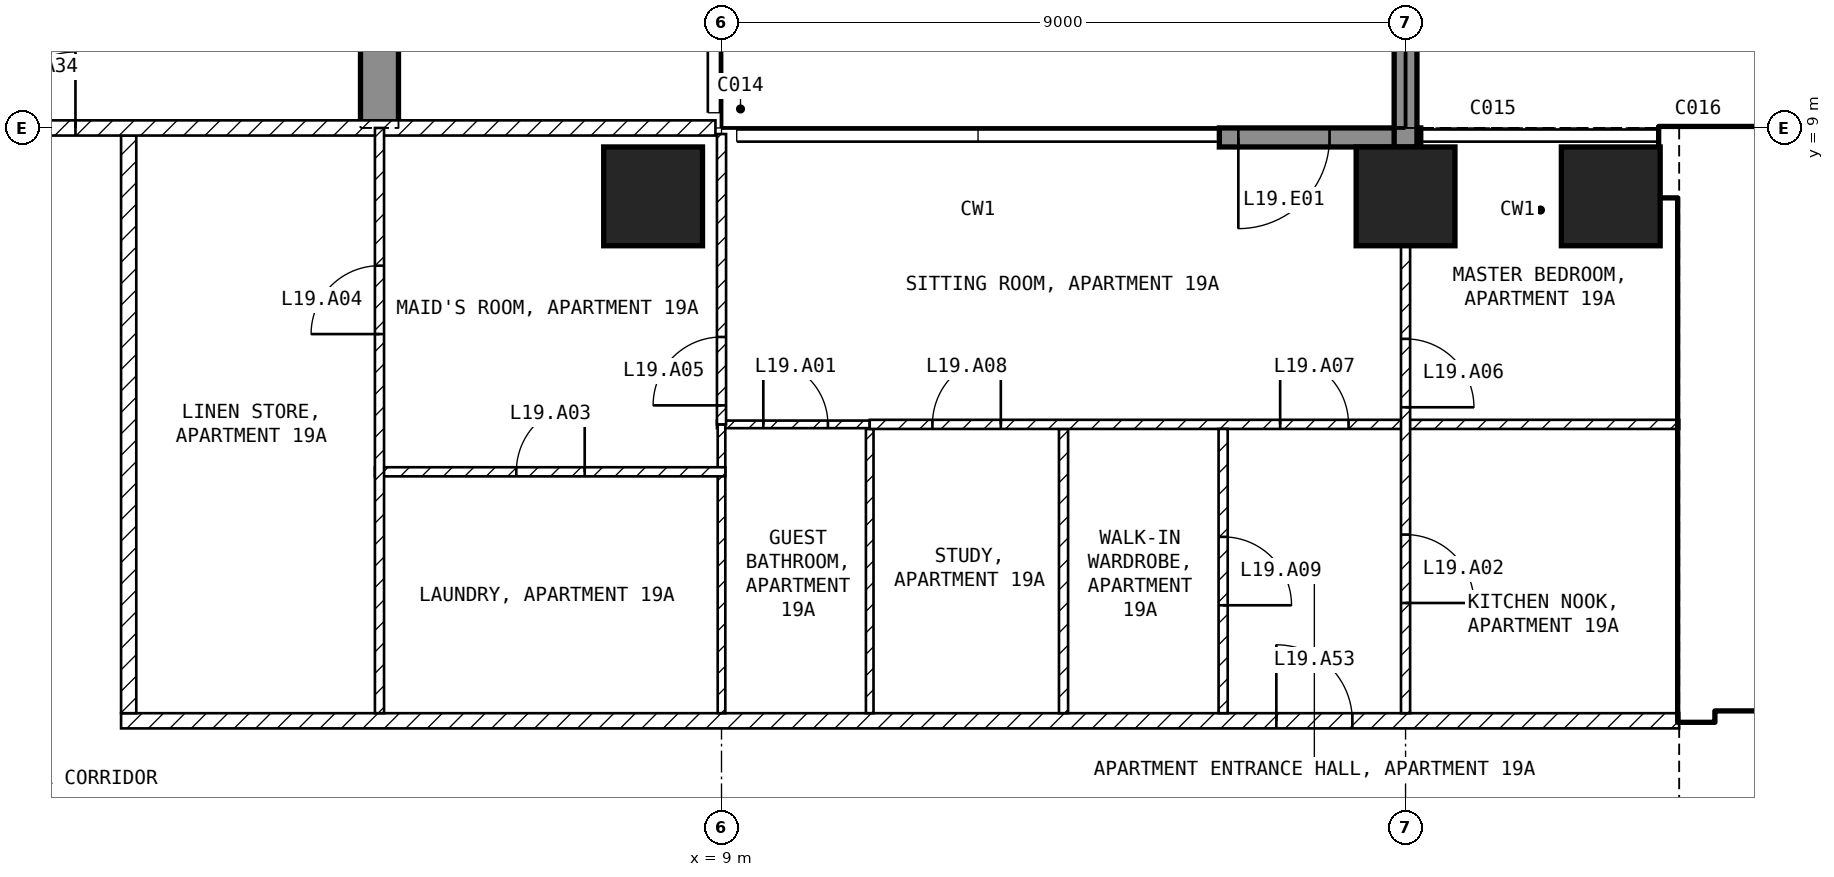
"""IFC4 building model, lengths in metres.
Left out: names, types, materials, properties, quantities, classifications, styles, units other than length and angle.
Written with IfcOpenShell. Run it as: python <this file> out.ifc"""

import sys

from ifc_helpers import new_model, si_unit, direction, frame, frame_2d, origin, origin_2d, place, context, subcontext, project, spatial, polyline, rectangle, outline, extrude, element, fill, save


model = new_model("IFC4")
c1 = context("Model", 3, precision=1e-05, world=origin(), true_north=direction((0.0, 1.0)))
c2 = subcontext(c1, "Body", "Model", "MODEL_VIEW")
j1 = project(units=[si_unit("LENGTHUNIT", "METRE"), si_unit("PLANEANGLEUNIT", "RADIAN")], contexts=[c1])
p1 = place(None, origin())
s1 = spatial("IfcSite", under=j1, at=p1, CompositionType="ELEMENT")
p2 = place(p1, origin())
s2 = spatial("IfcBuilding", under=s1, at=p2, CompositionType="ELEMENT")
p3 = place(p2, frame((0.0, 0.0, 85.5)))
s3 = spatial("IfcBuildingStorey", under=s2, at=p3, CompositionType="ELEMENT", Elevation=85.5)
for number, where, z_axis, x_axis in (
    (1, (8.1, 8.1, -0.25), (0.0, 0.0, 1.0), (1.0, 0.0, 0.0)),
    (2, (18.0, 8.1, -0.25), (0.0, 0.0, 1.0), (1.0, 0.0, 0.0)),
    (3, (20.7, 8.1, -0.25), (0.0, 0.0, 1.0), (1.0, 0.0, 0.0)),
):
    element("IfcColumn", number, at=place(p3, frame(where, z_axis=z_axis, x_axis=x_axis)), inside=s3, PredefinedType="COLUMN", context=c2, shape_type="SweptSolid", body=[
        extrude(rectangle(XDim=1.3, YDim=1.3, at=origin_2d()), origin(), (0.0, 0.0, 1.0), 3.5),
    ])
p4 = place(p3, frame((4.25, 9.0, -0.25), z_axis=(1.0, 0.0, 0.0), x_axis=(0.0, 1.0, 0.0)))
e4 = element("IfcWall", 4, at=p4, inside=s3, PredefinedType="SHEAR", context=c2, shape_type="SweptSolid", body=[
    extrude(outline(polyline([(0.0, 0.0), (2.1, 0.0), (2.1, 2.65), (4.5, 2.65), (4.5, 0.0), (9.9, 0.0), (9.9, 2.65), (12.3, 2.65), (12.3, 0.0), (16.45, 0.0), (16.45, 3.5), (0.0, 3.5), (0.0, 0.0)])), origin(), (0.0, 0.0, 1.0), 0.5),
])
p5 = place(p3, frame((18.2, 8.875, 0.0), z_axis=(0.0, 0.0, 1.0), x_axis=(-1.0, 0.0, 0.0)))
e5 = element("IfcWall", 5, at=p5, inside=s3, PredefinedType="SOLIDWALL", context=c2, shape_type="SweptSolid", body=[
    extrude(rectangle(XDim=2.65, YDim=0.25, at=frame_2d((1.325, 0.0))), origin(), (0.0, 0.0, 1.0), 3.25),
])
p6 = place(p5, frame((1.2, 0.0, 0.0)))
e6 = element("IfcOpeningElement", 6, at=p6, cuts=e5, PredefinedType="OPENING", context=c2, shape_type="SweptSolid", body=[
    extrude(rectangle(XDim=1.2, YDim=2.4, at=frame_2d((0.6, 1.2))), frame((0.0, 0.135, 0.0), z_axis=(0.0, -1.0, 0.0), x_axis=(1.0, 0.0, 0.0)), (0.0, 0.0, 1.0), 0.27),
])
p7 = place(p3, frame((18.0, 8.75, 0.0), z_axis=(0.0, 0.0, 1.0), x_axis=(0.0, 1.0, 0.0)))
e7 = element("IfcWall", 7, at=p7, inside=s3, PredefinedType="SOLIDWALL", context=c2, shape_type="SweptSolid", body=[
    extrude(rectangle(XDim=2.95, YDim=0.3, at=frame_2d((1.475, 0.0))), origin(), (0.0, 0.0, 1.0), 3.25),
])
p8 = place(p3, frame((21.35, 8.55, 0.0), z_axis=(0.0, 0.0, 1.0), x_axis=(1.0, 0.0, 0.0)))
e8 = element("IfcWall", 8, at=p8, inside=s3, PredefinedType="SHEAR", context=c2, shape_type="SweptSolid", body=[
    extrude(rectangle(XDim=10.15, YDim=0.9, at=frame_2d((5.075, 0.0))), origin(), (0.0, 0.0, 1.0), 3.25),
])
p9 = place(p3, frame((21.825, 1.2, 0.0), z_axis=(0.0, 0.0, 1.0), x_axis=(0.0, 1.0, 0.0)))
e9 = element("IfcWall", 9, at=p9, inside=s3, PredefinedType="SHEAR", context=c2, shape_type="SweptSolid", body=[
    extrude(rectangle(XDim=6.9, YDim=0.45, at=frame_2d((3.45, 0.0))), origin(), (0.0, 0.0, 1.0), 3.25),
])
p10 = place(p3, frame((22.05, 1.45, 0.0), z_axis=(0.0, 0.0, 1.0), x_axis=(1.0, 0.0, 0.0)))
e10 = element("IfcWall", 10, at=p10, inside=s3, PredefinedType="SOLIDWALL", context=c2, shape_type="SweptSolid", body=[
    extrude(rectangle(XDim=13.05, YDim=0.2, at=frame_2d((6.525, 0.0))), origin(), (0.0, 0.0, 1.0), 3.25),
])
p11 = place(p10, frame((0.75, 0.0, 0.0)))
e11 = element("IfcOpeningElement", 11, at=p11, cuts=e10, PredefinedType="OPENING", context=c2, shape_type="SweptSolid", body=[
    extrude(rectangle(XDim=1.0, YDim=2.1, at=frame_2d((0.5, 1.05))), frame((0.0, 0.11, 0.0), z_axis=(0.0, -1.0, 0.0), x_axis=(1.0, 0.0, 0.0)), (0.0, 0.0, 1.0), 0.22),
])
p12 = place(p10, frame((3.25, 0.0, 0.0)))
e12 = element("IfcOpeningElement", 12, at=p12, cuts=e10, PredefinedType="OPENING", context=c2, shape_type="SweptSolid", body=[
    extrude(rectangle(XDim=1.0, YDim=2.1, at=frame_2d((0.5, 1.05))), frame((0.0, 0.11, 0.0), z_axis=(0.0, -1.0, 0.0), x_axis=(1.0, 0.0, 0.0)), (0.0, 0.0, 1.0), 0.22),
])
p13 = place(p3, frame((22.05, 5.15, 0.0), z_axis=(0.0, 0.0, 1.0), x_axis=(1.0, 0.0, 0.0)))
e13 = element("IfcWall", 13, at=p13, inside=s3, PredefinedType="SOLIDWALL", context=c2, shape_type="SweptSolid", body=[
    extrude(rectangle(XDim=6.3, YDim=0.2, at=frame_2d((3.15, 0.0))), origin(), (0.0, 0.0, 1.0), 3.25),
])
p14 = place(p13, frame((0.2, 0.0, 0.0)))
e14 = element("IfcOpeningElement", 14, at=p14, cuts=e13, PredefinedType="OPENING", context=c2, shape_type="SweptSolid", body=[
    extrude(rectangle(XDim=1.0, YDim=2.1, at=frame_2d((0.5, 1.05))), frame((0.0, 0.11, 0.0), z_axis=(0.0, -1.0, 0.0), x_axis=(1.0, 0.0, 0.0)), (0.0, 0.0, 1.0), 0.22),
])
p15 = place(p3, frame((1.1, 1.2, 0.0), z_axis=(0.0, 0.0, 1.0), x_axis=(1.0, 0.0, 0.0)))
e15 = element("IfcWall", 15, at=p15, inside=s3, PredefinedType="PARTITIONING", context=c2, shape_type="SweptSolid", body=[
    extrude(rectangle(XDim=20.5, YDim=0.2, at=frame_2d((10.25, 0.0))), origin(), (0.0, 0.0, 1.0), 3.25),
])
p16 = place(p15, frame((15.2, 0.0, 0.0)))
e16 = element("IfcOpeningElement", 16, at=p16, cuts=e15, PredefinedType="OPENING", context=c2, shape_type="SweptSolid", body=[
    extrude(rectangle(XDim=1.0, YDim=2.1, at=frame_2d((0.5, 1.05))), frame((0.0, 0.11, 0.0), z_axis=(0.0, -1.0, 0.0), x_axis=(1.0, 0.0, 0.0)), (0.0, 0.0, 1.0), 0.22),
])
p17 = place(p3, frame((1.2, 8.9, 0.0), z_axis=(0.0, 0.0, 1.0), x_axis=(0.0, -1.0, 0.0)))
e17 = element("IfcWall", 17, at=p17, inside=s3, PredefinedType="PARTITIONING", context=c2, shape_type="SweptSolid", body=[
    extrude(rectangle(XDim=7.6, YDim=0.2, at=frame_2d((3.8, 0.0))), origin(), (0.0, 0.0, 1.0), 3.25),
])
p18 = place(p3, frame((-8.92, 9.0, 0.0), z_axis=(0.0, 0.0, 1.0), x_axis=(1.0, 0.0, 0.0)))
e18 = element("IfcWall", 18, at=p18, inside=s3, PredefinedType="PARTITIONING", context=c2, shape_type="SweptSolid", body=[
    extrude(rectangle(XDim=17.84, YDim=0.2, at=frame_2d((8.92, 0.0))), origin(), (0.0, 0.0, 1.0), 3.25),
])
p19 = place(p18, frame((8.42, 0.0, 0.0)))
e19 = element("IfcOpeningElement", 19, at=p19, cuts=e18, PredefinedType="OPENING", context=c2, shape_type="SweptSolid", body=[
    extrude(rectangle(XDim=1.0, YDim=2.1, at=frame_2d((0.5, 1.05))), frame((0.0, 0.11, 0.0), z_axis=(0.0, -1.0, 0.0), x_axis=(1.0, 0.0, 0.0)), (0.0, 0.0, 1.0), 0.22),
])
p20 = place(p3, frame((10.95, 5.04, 0.0), z_axis=(0.0, 0.0, 1.0), x_axis=(0.0, -1.0, 0.0)))
e20 = element("IfcWall", 20, at=p20, inside=s3, PredefinedType="PARTITIONING", context=c2, shape_type="SweptSolid", body=[
    extrude(rectangle(XDim=3.74, YDim=0.1, at=frame_2d((1.87, 0.0))), origin(), (0.0, 0.0, 1.0), 3.25),
])
p21 = place(p3, frame((8.94, 5.1, 0.0), z_axis=(0.0, 0.0, 1.0), x_axis=(1.0, 0.0, 0.0)))
e21 = element("IfcWall", 21, at=p21, inside=s3, PredefinedType="PARTITIONING", context=c2, shape_type="SweptSolid", body=[
    extrude(rectangle(XDim=2.01, YDim=0.1, at=frame_2d((1.005, 0.0))), origin(), (0.0, 0.0, 1.0), 3.25),
])
p22 = place(p21, frame((0.61, 0.0, 0.0)))
e22 = element("IfcOpeningElement", 22, at=p22, cuts=e21, PredefinedType="OPENING", context=c2, shape_type="SweptSolid", body=[
    extrude(rectangle(XDim=0.85, YDim=2.1, at=frame_2d((0.425, 1.05))), frame((0.0, 0.06, 0.0), z_axis=(0.0, -1.0, 0.0), x_axis=(1.0, 0.0, 0.0)), (0.0, 0.0, 1.0), 0.12),
])
p23 = place(p3, frame((9.0, 1.3, 0.0), z_axis=(0.0, 0.0, 1.0), x_axis=(0.0, 1.0, 0.0)))
e23 = element("IfcWall", 23, at=p23, inside=s3, PredefinedType="PARTITIONING", context=c2, shape_type="SweptSolid", body=[
    extrude(rectangle(XDim=3.8, YDim=0.1, at=frame_2d((1.9, 0.0))), origin(), (0.0, 0.0, 1.0), 3.25),
])
p24 = place(p3, frame((13.5, 5.04, 0.0), z_axis=(0.0, 0.0, 1.0), x_axis=(0.0, -1.0, 0.0)))
e24 = element("IfcWall", 24, at=p24, inside=s3, PredefinedType="PARTITIONING", context=c2, shape_type="SweptSolid", body=[
    extrude(rectangle(XDim=3.74, YDim=0.12, at=frame_2d((1.87, 0.0))), origin(), (0.0, 0.0, 1.0), 3.25),
])
p25 = place(p3, frame((10.95, 5.1, 0.0), z_axis=(0.0, 0.0, 1.0), x_axis=(1.0, 0.0, 0.0)))
e25 = element("IfcWall", 25, at=p25, inside=s3, PredefinedType="PARTITIONING", context=c2, shape_type="SweptSolid", body=[
    extrude(rectangle(XDim=10.65, YDim=0.12, at=frame_2d((5.325, 0.0))), origin(), (0.0, 0.0, 1.0), 3.25),
])
p26 = place(p25, frame((5.4, 0.0, 0.0)))
e26 = element("IfcOpeningElement", 26, at=p26, cuts=e25, PredefinedType="OPENING", context=c2, shape_type="SweptSolid", body=[
    extrude(rectangle(XDim=0.9, YDim=2.1, at=frame_2d((0.45, 1.05))), frame((0.0, 0.07, 0.0), z_axis=(0.0, -1.0, 0.0), x_axis=(1.0, 0.0, 0.0)), (0.0, 0.0, 1.0), 0.14),
])
p27 = place(p25, frame((0.825, 0.0, 0.0)))
e27 = element("IfcOpeningElement", 27, at=p27, cuts=e25, PredefinedType="OPENING", context=c2, shape_type="SweptSolid", body=[
    extrude(rectangle(XDim=0.9, YDim=2.1, at=frame_2d((0.45, 1.05))), frame((0.0, 0.07, 0.0), z_axis=(0.0, -1.0, 0.0), x_axis=(1.0, 0.0, 0.0)), (0.0, 0.0, 1.0), 0.14),
])
p28 = place(p3, frame((15.6, 5.04, 0.0), z_axis=(0.0, 0.0, 1.0), x_axis=(0.0, -1.0, 0.0)))
e28 = element("IfcWall", 28, at=p28, inside=s3, PredefinedType="PARTITIONING", context=c2, shape_type="SweptSolid", body=[
    extrude(rectangle(XDim=3.74, YDim=0.12, at=frame_2d((1.87, 0.0))), origin(), (0.0, 0.0, 1.0), 3.25),
])
p29 = place(p28, frame((1.42, 0.0, 0.0)))
e29 = element("IfcOpeningElement", 29, at=p29, cuts=e28, PredefinedType="OPENING", context=c2, shape_type="SweptSolid", body=[
    extrude(rectangle(XDim=0.9, YDim=2.1, at=frame_2d((0.45, 1.05))), frame((0.0, 0.07, 0.0), z_axis=(0.0, -1.0, 0.0), x_axis=(1.0, 0.0, 0.0)), (0.0, 0.0, 1.0), 0.14),
])
p30 = place(p3, frame((18.0, 7.45, 0.0), z_axis=(0.0, 0.0, 1.0), x_axis=(0.0, -1.0, 0.0)))
e30 = element("IfcWall", 30, at=p30, inside=s3, PredefinedType="PARTITIONING", context=c2, shape_type="SweptSolid", body=[
    extrude(rectangle(XDim=6.15, YDim=0.12, at=frame_2d((3.075, 0.0))), origin(), (0.0, 0.0, 1.0), 2.346),
])
p31 = place(p30, frame((3.8, 0.0, 0.0)))
e31 = element("IfcOpeningElement", 31, at=p31, cuts=e30, PredefinedType="OPENING", context=c2, shape_type="SweptSolid", body=[
    extrude(rectangle(XDim=0.9, YDim=2.1, at=frame_2d((0.45, 1.05))), frame((0.0, 0.07, 0.0), z_axis=(0.0, -1.0, 0.0), x_axis=(1.0, 0.0, 0.0)), (0.0, 0.0, 1.0), 0.14),
])
p32 = place(p30, frame((1.225, 0.0, 0.0)))
e32 = element("IfcOpeningElement", 32, at=p32, cuts=e30, PredefinedType="OPENING", context=c2, shape_type="SweptSolid", body=[
    extrude(rectangle(XDim=0.9, YDim=2.1, at=frame_2d((0.45, 1.05))), frame((0.0, 0.07, 0.0), z_axis=(0.0, -1.0, 0.0), x_axis=(1.0, 0.0, 0.0)), (0.0, 0.0, 1.0), 0.14),
])
p33 = place(p3, frame((9.0, 5.1, 0.0), z_axis=(0.0, 0.0, 1.0), x_axis=(0.0, 1.0, 0.0)))
e33 = element("IfcWall", 33, at=p33, inside=s3, PredefinedType="PARTITIONING", context=c2, shape_type="SweptSolid", body=[
    extrude(rectangle(XDim=3.82, YDim=0.12, at=frame_2d((1.91, 0.0))), origin(), (0.0, 0.0, 1.0), 3.25),
])
p34 = place(p33, frame((0.25, 0.0, 0.0)))
e34 = element("IfcOpeningElement", 34, at=p34, cuts=e33, PredefinedType="OPENING", context=c2, shape_type="SweptSolid", body=[
    extrude(rectangle(XDim=0.9, YDim=2.1, at=frame_2d((0.45, 1.05))), frame((0.0, 0.07, 0.0), z_axis=(0.0, -1.0, 0.0), x_axis=(1.0, 0.0, 0.0)), (0.0, 0.0, 1.0), 0.14),
])
p35 = place(p3, frame((4.44, 4.476, 0.0), z_axis=(0.0, 0.0, 1.0), x_axis=(1.0, 0.0, 0.0)))
e35 = element("IfcWall", 35, at=p35, inside=s3, PredefinedType="PARTITIONING", context=c2, shape_type="SweptSolid", body=[
    extrude(rectangle(XDim=4.61, YDim=0.12, at=frame_2d((2.305, 0.0))), origin(), (0.0, 0.0, 1.0), 3.25),
])
p36 = place(p35, frame((1.86, 0.0, 0.0)))
e36 = element("IfcOpeningElement", 36, at=p36, cuts=e35, PredefinedType="OPENING", context=c2, shape_type="SweptSolid", body=[
    extrude(rectangle(XDim=0.9, YDim=2.1, at=frame_2d((0.45, 1.05))), frame((0.0, 0.07, 0.0), z_axis=(0.0, -1.0, 0.0), x_axis=(1.0, 0.0, 0.0)), (0.0, 0.0, 1.0), 0.14),
])
p37 = place(p3, frame((4.5, 1.3, 0.0), z_axis=(0.0, 0.0, 1.0), x_axis=(0.0, 1.0, 0.0)))
e37 = element("IfcWall", 37, at=p37, inside=s3, PredefinedType="PARTITIONING", context=c2, shape_type="SweptSolid", body=[
    extrude(rectangle(XDim=7.7, YDim=0.12, at=frame_2d((3.85, 0.0))), origin(), (0.0, 0.0, 1.0), 3.25),
])
p38 = place(p37, frame((4.988, 0.0, 0.0)))
e38 = element("IfcOpeningElement", 38, at=p38, cuts=e37, PredefinedType="OPENING", context=c2, shape_type="SweptSolid", body=[
    extrude(rectangle(XDim=0.9, YDim=2.1, at=frame_2d((0.45, 1.05))), frame((0.0, 0.07, 0.0), z_axis=(0.0, -1.0, 0.0), x_axis=(1.0, 0.0, 0.0)), (0.0, 0.0, 1.0), 0.14),
])
p39 = place(p6, origin())
e39 = element("IfcDoor", 39, at=p39, inside=s3, OperationType="SINGLE_SWING_RIGHT", PredefinedType="DOOR", context=c2, shape_type="SweptSolid", body=[
    extrude(rectangle(XDim=1.2, YDim=2.4, at=frame_2d((0.6, 1.2))), frame((0.0, 0.025, 0.0), z_axis=(0.0, -1.0, 0.0), x_axis=(1.0, 0.0, 0.0)), (0.0, 0.0, 1.0), 0.05),
])
fill(e6, e39)
p40 = place(p14, origin())
e40 = element("IfcDoor", 40, at=p40, inside=s3, OperationType="SINGLE_SWING_LEFT", PredefinedType="DOOR", context=c2, shape_type="SweptSolid", body=[
    extrude(rectangle(XDim=1.0, YDim=2.1, at=frame_2d((0.5, 1.05))), frame((0.0, 0.025, 0.0), z_axis=(0.0, -1.0, 0.0), x_axis=(1.0, 0.0, 0.0)), (0.0, 0.0, 1.0), 0.05),
])
fill(e14, e40)
p41 = place(p22, origin())
e41 = element("IfcDoor", 41, at=p41, inside=s3, OperationType="SINGLE_SWING_LEFT", PredefinedType="DOOR", context=c2, shape_type="SweptSolid", body=[
    extrude(rectangle(XDim=0.85, YDim=2.1, at=frame_2d((0.425, 1.05))), frame((0.0, 0.025, 0.0), z_axis=(0.0, -1.0, 0.0), x_axis=(1.0, 0.0, 0.0)), (0.0, 0.0, 1.0), 0.05),
])
fill(e22, e41)
p42 = place(p31, origin())
e42 = element("IfcDoor", 42, at=p42, inside=s3, OperationType="SINGLE_SWING_RIGHT", PredefinedType="DOOR", context=c2, shape_type="SweptSolid", body=[
    extrude(rectangle(XDim=0.9, YDim=2.1, at=frame_2d((0.45, 1.05))), frame((0.0, 0.025, 0.0), z_axis=(0.0, -1.0, 0.0), x_axis=(1.0, 0.0, 0.0)), (0.0, 0.0, 1.0), 0.05),
])
fill(e31, e42)
p43 = place(p36, origin())
e43 = element("IfcDoor", 43, at=p43, inside=s3, OperationType="SINGLE_SWING_RIGHT", PredefinedType="DOOR", context=c2, shape_type="SweptSolid", body=[
    extrude(rectangle(XDim=0.9, YDim=2.1, at=frame_2d((0.45, 1.05))), frame((0.0, 0.025, 0.0), z_axis=(0.0, -1.0, 0.0), x_axis=(1.0, 0.0, 0.0)), (0.0, 0.0, 1.0), 0.05),
])
fill(e36, e43)
p44 = place(p38, origin())
e44 = element("IfcDoor", 44, at=p44, inside=s3, OperationType="SINGLE_SWING_LEFT", PredefinedType="DOOR", context=c2, shape_type="SweptSolid", body=[
    extrude(rectangle(XDim=0.9, YDim=2.1, at=frame_2d((0.45, 1.05))), frame((0.0, 0.025, 0.0), z_axis=(0.0, -1.0, 0.0), x_axis=(1.0, 0.0, 0.0)), (0.0, 0.0, 1.0), 0.05),
])
fill(e38, e44)
p45 = place(p34, origin())
e45 = element("IfcDoor", 45, at=p45, inside=s3, OperationType="SINGLE_SWING_LEFT", PredefinedType="DOOR", context=c2, shape_type="SweptSolid", body=[
    extrude(rectangle(XDim=0.9, YDim=2.1, at=frame_2d((0.45, 1.05))), frame((0.0, 0.025, 0.0), z_axis=(0.0, -1.0, 0.0), x_axis=(1.0, 0.0, 0.0)), (0.0, 0.0, 1.0), 0.05),
])
fill(e34, e45)
p46 = place(p32, origin())
e46 = element("IfcDoor", 46, at=p46, inside=s3, OperationType="SINGLE_SWING_RIGHT", PredefinedType="DOOR", context=c2, shape_type="SweptSolid", body=[
    extrude(rectangle(XDim=0.9, YDim=2.1, at=frame_2d((0.45, 1.05))), frame((0.0, 0.025, 0.0), z_axis=(0.0, -1.0, 0.0), x_axis=(1.0, 0.0, 0.0)), (0.0, 0.0, 1.0), 0.05),
])
fill(e32, e46)
p47 = place(p26, origin())
e47 = element("IfcDoor", 47, at=p47, inside=s3, OperationType="SINGLE_SWING_LEFT", PredefinedType="DOOR", context=c2, shape_type="SweptSolid", body=[
    extrude(rectangle(XDim=0.9, YDim=2.1, at=frame_2d((0.45, 1.05))), frame((0.0, 0.025, 0.0), z_axis=(0.0, -1.0, 0.0), x_axis=(1.0, 0.0, 0.0)), (0.0, 0.0, 1.0), 0.05),
])
fill(e26, e47)
p48 = place(p27, origin())
e48 = element("IfcDoor", 48, at=p48, inside=s3, OperationType="SINGLE_SWING_RIGHT", PredefinedType="DOOR", context=c2, shape_type="SweptSolid", body=[
    extrude(rectangle(XDim=0.9, YDim=2.1, at=frame_2d((0.45, 1.05))), frame((0.0, 0.025, 0.0), z_axis=(0.0, -1.0, 0.0), x_axis=(1.0, 0.0, 0.0)), (0.0, 0.0, 1.0), 0.05),
])
fill(e27, e48)
p49 = place(p29, origin())
e49 = element("IfcDoor", 49, at=p49, inside=s3, OperationType="SINGLE_SWING_RIGHT", PredefinedType="DOOR", context=c2, shape_type="SweptSolid", body=[
    extrude(rectangle(XDim=0.9, YDim=2.1, at=frame_2d((0.45, 1.05))), frame((0.0, 0.025, 0.0), z_axis=(0.0, -1.0, 0.0), x_axis=(1.0, 0.0, 0.0)), (0.0, 0.0, 1.0), 0.05),
])
fill(e29, e49)
p50 = place(p19, origin())
e50 = element("IfcDoor", 50, at=p50, inside=s3, OperationType="SINGLE_SWING_RIGHT", PredefinedType="DOOR", context=c2, shape_type="SweptSolid", body=[
    extrude(rectangle(XDim=1.0, YDim=2.1, at=frame_2d((0.5, 1.05))), frame((0.0, 0.025, 0.0), z_axis=(0.0, -1.0, 0.0), x_axis=(1.0, 0.0, 0.0)), (0.0, 0.0, 1.0), 0.05),
])
fill(e19, e50)
p51 = place(p16, origin())
e51 = element("IfcDoor", 51, at=p51, inside=s3, OperationType="SINGLE_SWING_LEFT", PredefinedType="DOOR", context=c2, shape_type="SweptSolid", body=[
    extrude(rectangle(XDim=1.0, YDim=2.1, at=frame_2d((0.5, 1.05))), frame((0.0, 0.025, 0.0), z_axis=(0.0, -1.0, 0.0), x_axis=(1.0, 0.0, 0.0)), (0.0, 0.0, 1.0), 0.05),
])
fill(e16, e51)
save(model, sys.argv[1])
